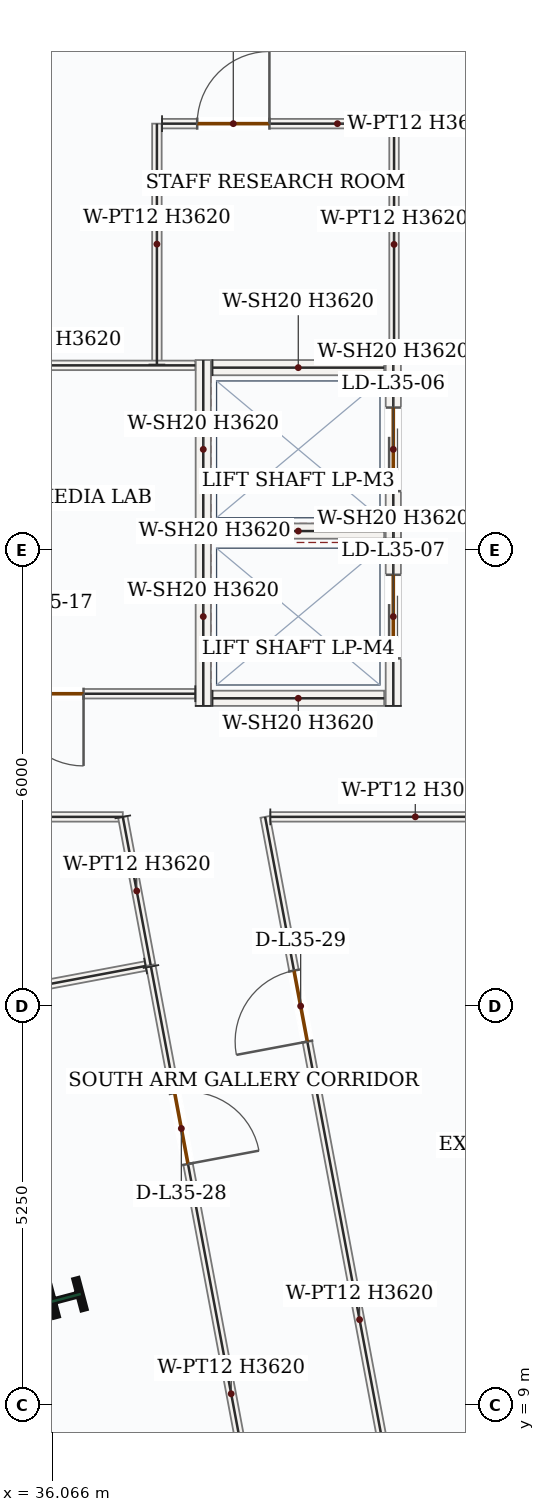
"""IFC4 building model, lengths in metres.
Left out: names, types, materials, properties, quantities, classifications, styles, units other than length and angle.
Written with IfcOpenShell. Run it as: python <this file> out.ifc"""

import sys

from ifc_helpers import new_model, si_unit, direction, frame, frame_2d, origin, origin_2d, place, context, subcontext, project, spatial, rectangle, i_section, extrude, source, transform, mapped, element, fill, save


model = new_model("IFC4")
c1 = context("Model", 3, precision=1e-05, world=origin(), true_north=direction((0.0, 1.0)))
c2 = subcontext(c1, "Body", "Model", "MODEL_VIEW")
j1 = project(units=[si_unit("LENGTHUNIT", "METRE"), si_unit("PLANEANGLEUNIT", "RADIAN")], contexts=[c1])
p1 = place(None, origin())
s1 = spatial("IfcSite", under=j1, at=p1, CompositionType="ELEMENT")
p2 = place(p1, origin())
s2 = spatial("IfcBuilding", under=s1, at=p2, CompositionType="ELEMENT")
p3 = place(p2, frame((0.0, 0.0, 155.1)))
s3 = spatial("IfcBuildingStorey", under=s2, at=p3, CompositionType="ELEMENT", Elevation=155.1)
m1 = source(origin(), c2, "Body", "SweptSolid", [
    extrude(i_section(OverallWidth=0.412, OverallDepth=0.435, WebThickness=0.036, FlangeThickness=0.057, FilletRadius=0.018, at=origin_2d()), origin(), (0.0, 0.0, 1.0), 3.9),
])
p4 = place(p3, frame((36.245, 10.412, 0.0), z_axis=(0.0, 0.0, 1.0), x_axis=(-0.255445757936, 0.966823388604, 0.0)))
e1 = element("IfcColumn", 1, at=p4, inside=s3, PredefinedType="COLUMN", context=c2, shape_type="MappedRepresentation", body=[
    mapped(m1, transform((0.0, 0.0, 0.0), x_axis=(1.0, 0.0, 0.0), y_axis=(0.0, 1.0, 0.0), z_axis=(0.0, 0.0, 1.0), scale=1.0)),
])
m2 = source(origin(), c2, "Body", "SweptSolid", [
    extrude(rectangle(XDim=2.35, YDim=0.2, at=frame_2d((1.175, 0.0))), origin(), (0.0, 0.0, 1.0), 3.62),
])
p5 = place(p3, frame((38.05, 20.4, 0.0), z_axis=(0.0, 0.0, 1.0), x_axis=(0.0, 1.0, 0.0)))
e2 = element("IfcWall", 2, at=p5, inside=s3, PredefinedType="SOLIDWALL", context=c2, shape_type="MappedRepresentation", body=[
    mapped(m2, transform((0.0, 0.0, 0.0), x_axis=(1.0, 0.0, 0.0), y_axis=(0.0, 1.0, 0.0), z_axis=(0.0, 0.0, 1.0), scale=1.0)),
])
p6 = place(p3, frame((40.55, 20.4, 0.0), z_axis=(0.0, 0.0, 1.0), x_axis=(0.0, 1.0, 0.0)))
e3 = element("IfcWall", 3, at=p6, inside=s3, PredefinedType="SOLIDWALL", context=c2, shape_type="SweptSolid", body=[
    extrude(rectangle(XDim=2.35, YDim=0.2, at=frame_2d((1.175, 0.0))), origin(), (0.0, 0.0, 1.0), 3.62),
])
p7 = place(p6, frame((0.625, 0.0, 0.0)))
e4 = element("IfcOpeningElement", 4, at=p7, cuts=e3, PredefinedType="OPENING", context=c2, shape_type="SweptSolid", body=[
    extrude(rectangle(XDim=1.1, YDim=2.15, at=frame_2d((0.55, 1.075))), frame((0.0, 0.11, 0.0), z_axis=(0.0, -1.0, 0.0), x_axis=(1.0, 0.0, 0.0)), (0.0, 0.0, 1.0), 0.22),
])
m3 = source(origin(), c2, "Body", "SweptSolid", [
    extrude(rectangle(XDim=2.26, YDim=0.2, at=frame_2d((1.13, 0.0))), origin(), (0.0, 0.0, 1.0), 3.62),
])
for number, where, z_axis, x_axis in (
    (5, (38.17, 20.5, 0.0), (0.0, 0.0, 1.0), (1.0, 0.0, 0.0)),
    (6, (38.17, 22.65, 0.0), (0.0, 0.0, 1.0), (1.0, 0.0, 0.0)),
):
    element("IfcWall", number, at=place(p3, frame(where, z_axis=z_axis, x_axis=x_axis)), inside=s3, PredefinedType="SOLIDWALL", context=c2, shape_type="MappedRepresentation", body=[
        mapped(m3, transform((0.0, 0.0, 0.0), x_axis=(1.0, 0.0, 0.0), y_axis=(0.0, 1.0, 0.0), z_axis=(0.0, 0.0, 1.0), scale=1.0)),
    ])
p8 = place(p3, frame((38.05, 18.2, 0.0), z_axis=(0.0, 0.0, 1.0), x_axis=(0.0, 1.0, 0.0)))
e7 = element("IfcWall", 7, at=p8, inside=s3, PredefinedType="SOLIDWALL", context=c2, shape_type="MappedRepresentation", body=[
    mapped(m2, transform((0.0, 0.0, 0.0), x_axis=(1.0, 0.0, 0.0), y_axis=(0.0, 1.0, 0.0), z_axis=(0.0, 0.0, 1.0), scale=1.0)),
])
p9 = place(p3, frame((40.55, 18.2, 0.0), z_axis=(0.0, 0.0, 1.0), x_axis=(0.0, 1.0, 0.0)))
e8 = element("IfcWall", 8, at=p9, inside=s3, PredefinedType="SOLIDWALL", context=c2, shape_type="SweptSolid", body=[
    extrude(rectangle(XDim=2.35, YDim=0.2, at=frame_2d((1.175, 0.0))), origin(), (0.0, 0.0, 1.0), 3.62),
])
p10 = place(p9, frame((0.625, 0.0, 0.0)))
e9 = element("IfcOpeningElement", 9, at=p10, cuts=e8, PredefinedType="OPENING", context=c2, shape_type="SweptSolid", body=[
    extrude(rectangle(XDim=1.1, YDim=2.15, at=frame_2d((0.55, 1.075))), frame((0.0, 0.11, 0.0), z_axis=(0.0, -1.0, 0.0), x_axis=(1.0, 0.0, 0.0)), (0.0, 0.0, 1.0), 0.22),
])
p11 = place(p3, frame((38.17, 18.3, 0.0), z_axis=(0.0, 0.0, 1.0), x_axis=(1.0, 0.0, 0.0)))
e10 = element("IfcWall", 10, at=p11, inside=s3, PredefinedType="SOLIDWALL", context=c2, shape_type="MappedRepresentation", body=[
    mapped(m3, transform((0.0, 0.0, 0.0), x_axis=(1.0, 0.0, 0.0), y_axis=(0.0, 1.0, 0.0), z_axis=(0.0, 0.0, 1.0), scale=1.0)),
])
m4 = source(origin(), c2, "Body", "SweptSolid", [
    extrude(rectangle(XDim=3.17, YDim=0.125, at=frame_2d((1.585, 0.0))), origin(), (0.0, 0.0, 1.0), 3.62),
])
p12 = place(p3, frame((37.44, 22.69, 0.0), z_axis=(0.0, 0.0, 1.0), x_axis=(0.0, 1.0, 0.0)))
e11 = element("IfcWall", 11, at=p12, inside=s3, PredefinedType="PARTITIONING", context=c2, shape_type="MappedRepresentation", body=[
    mapped(m4, transform((0.0, 0.0, 0.0), x_axis=(1.0, 0.0, 0.0), y_axis=(0.0, 1.0, 0.0), z_axis=(0.0, 0.0, 1.0), scale=1.0)),
])
p13 = place(p3, frame((37.508, 25.86, 0.0), z_axis=(0.0, 0.0, 1.0), x_axis=(1.0, 0.0, 0.0)))
e12 = element("IfcWall", 12, at=p13, inside=s3, PredefinedType="PARTITIONING", context=c2, shape_type="SweptSolid", body=[
    extrude(rectangle(XDim=3.052, YDim=0.125, at=frame_2d((1.526, 0.0))), origin(), (0.0, 0.0, 1.0), 3.62),
])
p14 = place(p13, frame((0.463, 0.0, 0.0)))
e13 = element("IfcOpeningElement", 13, at=p14, cuts=e12, PredefinedType="OPENING", context=c2, shape_type="SweptSolid", body=[
    extrude(rectangle(XDim=0.95, YDim=2.15, at=frame_2d((0.475, 1.075))), frame((0.0, 0.073, 0.0), z_axis=(0.0, -1.0, 0.0), x_axis=(1.0, 0.0, 0.0)), (0.0, 0.0, 1.0), 0.145),
])
m5 = source(origin(), c2, "Body", "SweptSolid", [
    extrude(rectangle(XDim=3.042, YDim=0.125, at=frame_2d((1.521, 0.0))), origin(), (0.0, 0.0, 1.0), 3.62),
])
p15 = place(p3, frame((40.56, 25.792, 0.0), z_axis=(0.0, 0.0, 1.0), x_axis=(0.0, -1.0, 0.0)))
e14 = element("IfcWall", 14, at=p15, inside=s3, PredefinedType="PARTITIONING", context=c2, shape_type="MappedRepresentation", body=[
    mapped(m5, transform((0.0, 0.0, 0.0), x_axis=(1.0, 0.0, 0.0), y_axis=(0.0, 1.0, 0.0), z_axis=(0.0, 0.0, 1.0), scale=1.0)),
])
m6 = source(origin(), c2, "Body", "SweptSolid", [
    extrude(rectangle(XDim=3.89, YDim=0.125, at=frame_2d((1.945, 0.0))), origin(), (0.0, 0.0, 1.0), 3.62),
])
p16 = place(p3, frame((34.055, 22.68, 0.0), z_axis=(0.0, 0.0, 1.0), x_axis=(1.0, 0.0, 0.0)))
e15 = element("IfcWall", 15, at=p16, inside=s3, PredefinedType="PARTITIONING", context=c2, shape_type="MappedRepresentation", body=[
    mapped(m6, transform((0.0, 0.0, 0.0), x_axis=(1.0, 0.0, 0.0), y_axis=(0.0, 1.0, 0.0), z_axis=(0.0, 0.0, 1.0), scale=1.0)),
])
p17 = place(p3, frame((37.945, 18.36, 0.0), z_axis=(0.0, 0.0, 1.0), x_axis=(-1.0, 0.0, 0.0)))
e16 = element("IfcWall", 16, at=p17, inside=s3, PredefinedType="PARTITIONING", context=c2, shape_type="SweptSolid", body=[
    extrude(rectangle(XDim=3.89, YDim=0.125, at=frame_2d((1.945, 0.0))), origin(), (0.0, 0.0, 1.0), 3.62),
])
p18 = place(p17, frame((1.47, 0.0, 0.0)))
e17 = element("IfcOpeningElement", 17, at=p18, cuts=e16, PredefinedType="OPENING", context=c2, shape_type="SweptSolid", body=[
    extrude(rectangle(XDim=0.95, YDim=2.15, at=frame_2d((0.475, 1.075))), frame((0.0, 0.073, 0.0), z_axis=(0.0, -1.0, 0.0), x_axis=(1.0, 0.0, 0.0)), (0.0, 0.0, 1.0), 0.145),
])
p19 = place(p3, frame((29.256, 16.74, 0.0), z_axis=(0.0, 0.0, 1.0), x_axis=(1.0, 0.0, 0.0)))
e18 = element("IfcWall", 18, at=p19, inside=s3, PredefinedType="PARTITIONING", context=c2, shape_type="SweptSolid", body=[
    extrude(rectangle(XDim=7.736, YDim=0.125, at=frame_2d((3.868, 0.0))), origin(), (0.0, 0.0, 1.0), 3.62),
])
p20 = place(p19, frame((5.293, 0.0, 0.0)))
e19 = element("IfcOpeningElement", 19, at=p20, cuts=e18, PredefinedType="OPENING", context=c2, shape_type="SweptSolid", body=[
    extrude(rectangle(XDim=0.95, YDim=2.15, at=frame_2d((0.475, 1.075))), frame((0.0, 0.073, 0.0), z_axis=(0.0, -1.0, 0.0), x_axis=(1.0, 0.0, 0.0)), (0.0, 0.0, 1.0), 0.145),
])
m7 = source(origin(), c2, "Body", "SweptSolid", [
    extrude(rectangle(XDim=1.983, YDim=0.125, at=frame_2d((0.992, 0.0))), origin(), (0.0, 0.0, 1.0), 3.62),
])
p21 = place(p3, frame((36.991, 16.74, 0.0), z_axis=(0.0, 0.0, 1.0), x_axis=(0.184645271511, -0.982805231828, 0.0)))
e20 = element("IfcWall", 20, at=p21, inside=s3, PredefinedType="PARTITIONING", context=c2, shape_type="MappedRepresentation", body=[
    mapped(m7, transform((0.0, 0.0, 0.0), x_axis=(1.0, 0.0, 0.0), y_axis=(0.0, 1.0, 0.0), z_axis=(0.0, 0.0, 1.0), scale=1.0)),
])
m8 = source(origin(), c2, "Body", "SweptSolid", [
    extrude(rectangle(XDim=5.527, YDim=0.125, at=frame_2d((2.764, 0.0))), origin(), (0.0, 0.0, 1.0), 3.62),
])
p22 = place(p3, frame((37.291, 14.778, 0.0), z_axis=(0.0, 0.0, 1.0), x_axis=(-0.982808624954, -0.184627210117, 0.0)))
e21 = element("IfcWall", 21, at=p22, inside=s3, PredefinedType="PARTITIONING", context=c2, shape_type="MappedRepresentation", body=[
    mapped(m8, transform((0.0, 0.0, 0.0), x_axis=(1.0, 0.0, 0.0), y_axis=(0.0, 1.0, 0.0), z_axis=(0.0, 0.0, 1.0), scale=1.0)),
])
p23 = place(p3, frame((37.361, 14.771, 0.0), z_axis=(0.0, 0.0, 1.0), x_axis=(0.18463806937, -0.982806584908, 0.0)))
e22 = element("IfcWall", 22, at=p23, inside=s3, PredefinedType="PARTITIONING", context=c2, shape_type="SweptSolid", body=[
    extrude(rectangle(XDim=8.645, YDim=0.125, at=frame_2d((4.323, 0.0))), origin(), (0.0, 0.0, 1.0), 3.62),
])
p24 = place(p23, frame((1.693, 0.0, 0.0)))
e23 = element("IfcOpeningElement", 23, at=p24, cuts=e22, PredefinedType="OPENING", context=c2, shape_type="SweptSolid", body=[
    extrude(rectangle(XDim=0.95, YDim=2.15, at=frame_2d((0.475, 1.075))), frame((0.0, 0.073, 0.0), z_axis=(0.0, -1.0, 0.0), x_axis=(1.0, 0.0, 0.0)), (0.0, 0.0, 1.0), 0.145),
])
p25 = place(p3, frame((40.766, 6.615, 0.0), z_axis=(0.0, 0.0, 1.0), x_axis=(-0.184646211839, 0.982805055163, 0.0)))
e24 = element("IfcWall", 24, at=p25, inside=s3, PredefinedType="PARTITIONING", context=c2, shape_type="SweptSolid", body=[
    extrude(rectangle(XDim=10.303, YDim=0.125, at=frame_2d((5.151, 0.0))), origin(), (0.0, 0.0, 1.0), 3.62),
])
p26 = place(p25, frame((7.295, 0.0, 0.0)))
e25 = element("IfcOpeningElement", 25, at=p26, cuts=e24, PredefinedType="OPENING", context=c2, shape_type="SweptSolid", body=[
    extrude(rectangle(XDim=0.95, YDim=2.15, at=frame_2d((0.475, 1.075))), frame((0.0, 0.073, 0.0), z_axis=(0.0, -1.0, 0.0), x_axis=(1.0, 0.0, 0.0)), (0.0, 0.0, 1.0), 0.145),
])
m9 = source(origin(), c2, "Body", "SweptSolid", [
    extrude(rectangle(XDim=3.814, YDim=0.125, at=frame_2d((1.907, 0.0))), origin(), (0.0, 0.0, 1.0), 3.079),
])
p27 = place(p3, frame((38.932, 16.74, 0.0), z_axis=(0.0, 0.0, 1.0), x_axis=(0.999999948787, 0.000320040949, 0.0)))
e26 = element("IfcWall", 26, at=p27, inside=s3, PredefinedType="PARTITIONING", context=c2, shape_type="MappedRepresentation", body=[
    mapped(m9, transform((0.0, 0.0, 0.0), x_axis=(1.0, 0.0, 0.0), y_axis=(0.0, 1.0, 0.0), z_axis=(0.0, 0.0, 1.0), scale=1.0)),
])
m10 = source(origin(), c2, "Body", "SweptSolid", [
    extrude(rectangle(XDim=1.1, YDim=2.15, at=frame_2d((0.55, 1.075))), frame((0.0, 0.025, 0.0), z_axis=(0.0, -1.0, 0.0), x_axis=(1.0, 0.0, 0.0)), (0.0, 0.0, 1.0), 0.05),
])
p28 = place(p7, origin())
e27 = element("IfcDoor", 27, at=p28, inside=s3, OperationType="DOUBLE_DOOR_SLIDING", PredefinedType="DOOR", context=c2, shape_type="MappedRepresentation", body=[
    mapped(m10, transform((0.0, 0.0, 0.0), x_axis=(1.0, 0.0, 0.0), y_axis=(0.0, 1.0, 0.0), z_axis=(0.0, 0.0, 1.0), scale=1.0)),
])
fill(e4, e27)
p29 = place(p10, origin())
e28 = element("IfcDoor", 28, at=p29, inside=s3, OperationType="DOUBLE_DOOR_SLIDING", PredefinedType="DOOR", context=c2, shape_type="MappedRepresentation", body=[
    mapped(m10, transform((0.0, 0.0, 0.0), x_axis=(1.0, 0.0, 0.0), y_axis=(0.0, 1.0, 0.0), z_axis=(0.0, 0.0, 1.0), scale=1.0)),
])
fill(e9, e28)
m11 = source(origin(), c2, "Body", "SweptSolid", [
    extrude(rectangle(XDim=0.95, YDim=2.15, at=frame_2d((0.475, 1.075))), frame((0.0, 0.025, 0.0), z_axis=(0.0, -1.0, 0.0), x_axis=(1.0, 0.0, 0.0)), (0.0, 0.0, 1.0), 0.05),
])
p30 = place(p14, origin())
e29 = element("IfcDoor", 29, at=p30, inside=s3, OperationType="SINGLE_SWING_RIGHT", PredefinedType="DOOR", context=c2, shape_type="MappedRepresentation", body=[
    mapped(m11, transform((0.0, 0.0, 0.0), x_axis=(1.0, 0.0, 0.0), y_axis=(0.0, 1.0, 0.0), z_axis=(0.0, 0.0, 1.0), scale=1.0)),
])
fill(e13, e29)
p31 = place(p18, origin())
e30 = element("IfcDoor", 30, at=p31, inside=s3, OperationType="SINGLE_SWING_LEFT", PredefinedType="DOOR", context=c2, shape_type="MappedRepresentation", body=[
    mapped(m11, transform((0.0, 0.0, 0.0), x_axis=(1.0, 0.0, 0.0), y_axis=(0.0, 1.0, 0.0), z_axis=(0.0, 0.0, 1.0), scale=1.0)),
])
fill(e17, e30)
p32 = place(p24, origin())
e31 = element("IfcDoor", 31, at=p32, inside=s3, OperationType="SINGLE_SWING_RIGHT", PredefinedType="DOOR", context=c2, shape_type="MappedRepresentation", body=[
    mapped(m11, transform((0.0, 0.0, 0.0), x_axis=(1.0, 0.0, 0.0), y_axis=(0.0, 1.0, 0.0), z_axis=(0.0, 0.0, 1.0), scale=1.0)),
])
fill(e23, e31)
p33 = place(p26, origin())
e32 = element("IfcDoor", 32, at=p33, inside=s3, OperationType="SINGLE_SWING_LEFT", PredefinedType="DOOR", context=c2, shape_type="MappedRepresentation", body=[
    mapped(m11, transform((0.0, 0.0, 0.0), x_axis=(1.0, 0.0, 0.0), y_axis=(0.0, 1.0, 0.0), z_axis=(0.0, 0.0, 1.0), scale=1.0)),
])
fill(e25, e32)
save(model, sys.argv[1])
